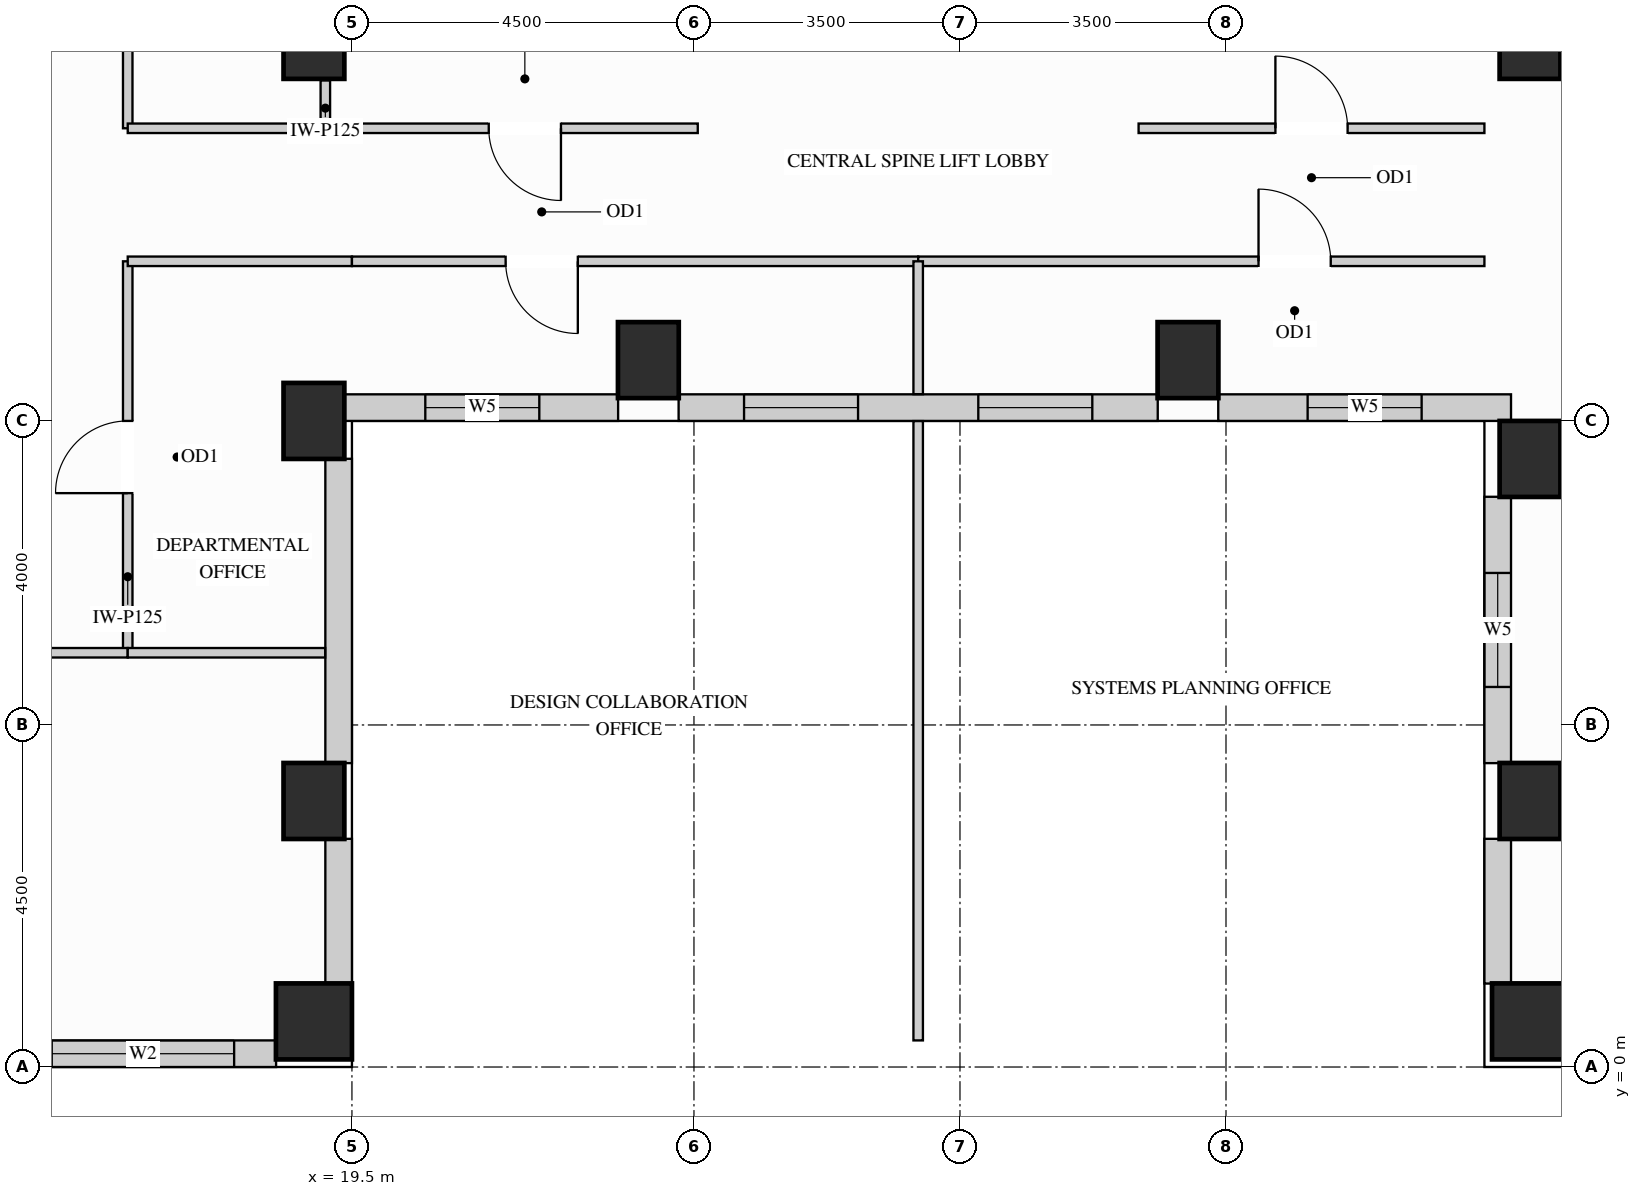
"""IFC4 building model, lengths in metres.
Left out: names, types, materials, properties, quantities, classifications, styles, units other than length and angle.
Written with IfcOpenShell. Run it as: python <this file> out.ifc"""

import sys

from ifc_helpers import new_model, si_unit, direction, frame, frame_2d, origin, origin_2d, place, context, subcontext, project, spatial, rectangle, extrude, source, transform, mapped, element, fill, save


model = new_model("IFC4")
c1 = context("Model", 3, precision=1e-05, world=origin(), true_north=direction((0.0, 1.0)))
c2 = subcontext(c1, "Body", "Model", "MODEL_VIEW")
j1 = project(units=[si_unit("LENGTHUNIT", "METRE"), si_unit("PLANEANGLEUNIT", "RADIAN")], contexts=[c1])
p1 = place(None, origin())
s1 = spatial("IfcSite", under=j1, at=p1, CompositionType="ELEMENT")
p2 = place(p1, origin())
s2 = spatial("IfcBuilding", under=s1, at=p2, CompositionType="ELEMENT")
p3 = place(p2, frame((0.0, 0.0, 171.9)))
s3 = spatial("IfcBuildingStorey", under=s2, at=p3, CompositionType="ELEMENT", Elevation=171.9)
m1 = source(origin(), c2, "Body", "SweptSolid", [
    extrude(rectangle(XDim=0.8, YDim=1.0, at=origin_2d()), origin(), (0.0, 0.0, 1.0), 3.4),
])
for number, where, z_axis, x_axis in (
    (1, (19.0, 13.5, 0.0), (0.0, 0.0, 1.0), (1.0, 0.0, 0.0)),
    (2, (19.0, 3.5, 0.0), (0.0, 0.0, 1.0), (1.0, 0.0, 0.0)),
    (3, (19.0, 8.5, 0.0), (0.0, 0.0, 1.0), (1.0, 0.0, 0.0)),
    (4, (35.0, 13.5, 0.0), (0.0, 0.0, 1.0), (1.0, 0.0, 0.0)),
    (5, (35.0, 3.5, 0.0), (0.0, 0.0, 1.0), (1.0, 0.0, 0.0)),
    (6, (35.0, 8.0, 0.0), (0.0, 0.0, 1.0), (1.0, 0.0, 0.0)),
    (7, (23.4, 9.3, 0.0), (0.0, 0.0, 1.0), (1.0, 0.0, 0.0)),
    (8, (30.5, 9.3, 0.0), (0.0, 0.0, 1.0), (1.0, 0.0, 0.0)),
):
    element("IfcColumn", number, at=place(p3, frame(where, z_axis=z_axis, x_axis=x_axis)), inside=s3, PredefinedType="COLUMN", context=c2, shape_type="MappedRepresentation", body=[
        mapped(m1, transform((0.0, 0.0, 0.0), x_axis=(1.0, 0.0, 0.0), y_axis=(0.0, 1.0, 0.0), z_axis=(0.0, 0.0, 1.0))),
    ])
m2 = source(origin(), c2, "Body", "SweptSolid", [
    extrude(rectangle(XDim=1.0, YDim=1.0, at=origin_2d()), origin(), (0.0, 0.0, 1.0), 3.4),
])
for number, where, z_axis, x_axis in (
    (9, (19.0, 0.6, 0.0), (0.0, 0.0, 1.0), (1.0, 0.0, 0.0)),
    (10, (35.0, 0.6, 0.0), (0.0, 0.0, 1.0), (1.0, 0.0, 0.0)),
):
    element("IfcColumn", number, at=place(p3, frame(where, z_axis=z_axis, x_axis=x_axis)), inside=s3, PredefinedType="COLUMN", context=c2, shape_type="MappedRepresentation", body=[
        mapped(m2, transform((0.0, 0.0, 0.0), x_axis=(1.0, 0.0, 0.0), y_axis=(0.0, 1.0, 0.0), z_axis=(0.0, 0.0, 1.0))),
    ])
p4 = place(p3, frame((14.998, 0.175, 0.0), z_axis=(0.0, 0.0, 1.0), x_axis=(1.0, 0.0, 0.0)))
e11 = element("IfcWall", 11, at=p4, inside=s3, PredefinedType="SOLIDWALL", context=c2, shape_type="SweptSolid", body=[
    extrude(rectangle(XDim=3.504, YDim=0.35, at=frame_2d((1.752, 0.0))), origin(), (0.0, 0.0, 1.0), 2.612),
])
p5 = place(p4, frame((0.552, 0.0, 0.78)))
e12 = element("IfcOpeningElement", 12, at=p5, cuts=e11, PredefinedType="OPENING", context=c2, shape_type="SweptSolid", body=[
    extrude(rectangle(XDim=2.4, YDim=1.652, at=frame_2d((1.2, 0.826))), frame((0.0, 0.185, 0.0), z_axis=(0.0, -1.0, 0.0), x_axis=(1.0, 0.0, 0.0)), (0.0, 0.0, 1.0), 0.37),
])
m3 = source(origin(), c2, "Body", "SweptSolid", [
    extrude(rectangle(XDim=1.904, YDim=0.35, at=frame_2d((0.952, 0.0))), origin(), (0.0, 0.0, 1.0), 2.612),
])
p6 = place(p3, frame((19.325, 1.098, 0.0), z_axis=(0.0, 0.0, 1.0), x_axis=(0.0, 1.0, 0.0)))
e13 = element("IfcWall", 13, at=p6, inside=s3, PredefinedType="SOLIDWALL", context=c2, shape_type="MappedRepresentation", body=[
    mapped(m3, transform((0.0, 0.0, 0.0), x_axis=(1.0, 0.0, 0.0), y_axis=(0.0, 1.0, 0.0), z_axis=(0.0, 0.0, 1.0))),
])
m4 = source(origin(), c2, "Body", "SweptSolid", [
    extrude(rectangle(XDim=4.004, YDim=0.35, at=frame_2d((2.002, 0.0))), origin(), (0.0, 0.0, 1.0), 2.612),
])
p7 = place(p3, frame((19.325, 3.998, 0.0), z_axis=(0.0, 0.0, 1.0), x_axis=(0.0, 1.0, 0.0)))
e14 = element("IfcWall", 14, at=p7, inside=s3, PredefinedType="SOLIDWALL", context=c2, shape_type="MappedRepresentation", body=[
    mapped(m4, transform((0.0, 0.0, 0.0), x_axis=(1.0, 0.0, 0.0), y_axis=(0.0, 1.0, 0.0), z_axis=(0.0, 0.0, 1.0))),
])
p8 = place(p3, frame((19.398, 8.675, 0.0), z_axis=(0.0, 0.0, 1.0), x_axis=(1.0, 0.0, 0.0)))
e15 = element("IfcWall", 15, at=p8, inside=s3, PredefinedType="SOLIDWALL", context=c2, shape_type="SweptSolid", body=[
    extrude(rectangle(XDim=3.604, YDim=0.35, at=frame_2d((1.802, 0.0))), origin(), (0.0, 0.0, 1.0), 3.385),
])
p9 = place(p8, frame((1.067, 0.0, 0.78)))
e16 = element("IfcOpeningElement", 16, at=p9, cuts=e15, PredefinedType="OPENING", context=c2, shape_type="SweptSolid", body=[
    extrude(rectangle(XDim=1.5, YDim=2.0, at=frame_2d((0.75, 1.0))), frame((0.0, 0.185, 0.0), z_axis=(0.0, -1.0, 0.0), x_axis=(1.0, 0.0, 0.0)), (0.0, 0.0, 1.0), 0.37),
])
p10 = place(p3, frame((23.798, 8.675, 0.0), z_axis=(0.0, 0.0, 1.0), x_axis=(1.0, 0.0, 0.0)))
e17 = element("IfcWall", 17, at=p10, inside=s3, PredefinedType="SOLIDWALL", context=c2, shape_type="SweptSolid", body=[
    extrude(rectangle(XDim=6.304, YDim=0.35, at=frame_2d((3.152, 0.0))), origin(), (0.0, 0.0, 1.0), 3.385),
])
p11 = place(p10, frame((0.861, 0.0, 0.78)))
e18 = element("IfcOpeningElement", 18, at=p11, cuts=e17, PredefinedType="OPENING", context=c2, shape_type="SweptSolid", body=[
    extrude(rectangle(XDim=1.5, YDim=2.0, at=frame_2d((0.75, 1.0))), frame((0.0, 0.185, 0.0), z_axis=(0.0, -1.0, 0.0), x_axis=(1.0, 0.0, 0.0)), (0.0, 0.0, 1.0), 0.37),
])
p12 = place(p10, frame((3.943, 0.0, 0.78)))
e19 = element("IfcOpeningElement", 19, at=p12, cuts=e17, PredefinedType="OPENING", context=c2, shape_type="SweptSolid", body=[
    extrude(rectangle(XDim=1.5, YDim=2.0, at=frame_2d((0.75, 1.0))), frame((0.0, 0.185, 0.0), z_axis=(0.0, -1.0, 0.0), x_axis=(1.0, 0.0, 0.0)), (0.0, 0.0, 1.0), 0.37),
])
p13 = place(p3, frame((30.898, 8.675, 0.0), z_axis=(0.0, 0.0, 1.0), x_axis=(1.0, 0.0, 0.0)))
e20 = element("IfcWall", 20, at=p13, inside=s3, PredefinedType="SOLIDWALL", context=c2, shape_type="SweptSolid", body=[
    extrude(rectangle(XDim=3.852, YDim=0.35, at=frame_2d((1.926, 0.0))), origin(), (0.0, 0.0, 1.0), 3.385),
])
p14 = place(p13, frame((1.176, 0.0, 0.78)))
e21 = element("IfcOpeningElement", 21, at=p14, cuts=e20, PredefinedType="OPENING", context=c2, shape_type="SweptSolid", body=[
    extrude(rectangle(XDim=1.5, YDim=2.0, at=frame_2d((0.75, 1.0))), frame((0.0, 0.185, 0.0), z_axis=(0.0, -1.0, 0.0), x_axis=(1.0, 0.0, 0.0)), (0.0, 0.0, 1.0), 0.37),
])
p15 = place(p3, frame((34.575, 7.502, 0.0), z_axis=(0.0, 0.0, 1.0), x_axis=(0.0, -1.0, 0.0)))
e22 = element("IfcWall", 22, at=p15, inside=s3, PredefinedType="SOLIDWALL", context=c2, shape_type="SweptSolid", body=[
    extrude(rectangle(XDim=3.504, YDim=0.35, at=frame_2d((1.752, 0.0))), origin(), (0.0, 0.0, 1.0), 2.612),
])
p16 = place(p15, frame((1.002, 0.0, 0.78)))
e23 = element("IfcOpeningElement", 23, at=p16, cuts=e22, PredefinedType="OPENING", context=c2, shape_type="SweptSolid", body=[
    extrude(rectangle(XDim=1.5, YDim=1.652, at=frame_2d((0.75, 0.826))), frame((0.0, 0.185, 0.0), z_axis=(0.0, -1.0, 0.0), x_axis=(1.0, 0.0, 0.0)), (0.0, 0.0, 1.0), 0.37),
])
p17 = place(p3, frame((34.575, 3.002, 0.0), z_axis=(0.0, 0.0, 1.0), x_axis=(0.0, -1.0, 0.0)))
e24 = element("IfcWall", 24, at=p17, inside=s3, PredefinedType="SOLIDWALL", context=c2, shape_type="MappedRepresentation", body=[
    mapped(m3, transform((0.0, 0.0, 0.0), x_axis=(1.0, 0.0, 0.0), y_axis=(0.0, 1.0, 0.0), z_axis=(0.0, 0.0, 1.0))),
])
m5 = source(origin(), c2, "Body", "SweptSolid", [
    extrude(rectangle(XDim=0.63, YDim=0.125, at=frame_2d((0.315, 0.0))), origin(), (0.0, 0.0, 1.0), 2.773),
])
p18 = place(p3, frame((19.15, 12.35, 0.0), z_axis=(0.0, 0.0, 1.0), x_axis=(0.0, 1.0, 0.0)))
e25 = element("IfcWall", 25, at=p18, inside=s3, PredefinedType="PARTITIONING", context=c2, shape_type="MappedRepresentation", body=[
    mapped(m5, transform((0.0, 0.0, 0.0), x_axis=(1.0, 0.0, 0.0), y_axis=(0.0, 1.0, 0.0), z_axis=(0.0, 0.0, 1.0))),
])
p19 = place(p3, frame((16.55, 12.35, 0.0), z_axis=(0.0, 0.0, 1.0), x_axis=(0.0, 1.0, 0.0)))
e26 = element("IfcWall", 26, at=p19, inside=s3, PredefinedType="PARTITIONING", context=c2, shape_type="SweptSolid", body=[
    extrude(rectangle(XDim=5.55, YDim=0.125, at=frame_2d((2.775, 0.0))), origin(), (0.0, 0.0, 1.0), 3.385),
])
p20 = place(p19, frame((2.3, 0.0, 0.0)))
e27 = element("IfcOpeningElement", 27, at=p20, cuts=e26, PredefinedType="OPENING", context=c2, shape_type="SweptSolid", body=[
    extrude(rectangle(XDim=0.95, YDim=2.15, at=frame_2d((0.475, 1.075))), frame((0.0, 0.073, 0.0), z_axis=(0.0, -1.0, 0.0), x_axis=(1.0, 0.0, 0.0)), (0.0, 0.0, 1.0), 0.145),
])
p21 = place(p3, frame((16.55, 5.45, 0.0), z_axis=(0.0, 0.0, 1.0), x_axis=(0.0, 1.0, 0.0)))
e28 = element("IfcWall", 28, at=p21, inside=s3, PredefinedType="PARTITIONING", context=c2, shape_type="SweptSolid", body=[
    extrude(rectangle(XDim=5.15, YDim=0.125, at=frame_2d((2.575, 0.0))), origin(), (0.0, 0.0, 1.0), 3.385),
])
p22 = place(p21, frame((2.1, 0.0, 0.0)))
e29 = element("IfcOpeningElement", 29, at=p22, cuts=e28, PredefinedType="OPENING", context=c2, shape_type="SweptSolid", body=[
    extrude(rectangle(XDim=0.95, YDim=2.15, at=frame_2d((0.475, 1.075))), frame((0.0, 0.073, 0.0), z_axis=(0.0, -1.0, 0.0), x_axis=(1.0, 0.0, 0.0)), (0.0, 0.0, 1.0), 0.145),
])
p23 = place(p3, frame((29.85, 12.35, 0.0), z_axis=(0.0, 0.0, 1.0), x_axis=(1.0, 0.0, 0.0)))
e30 = element("IfcWall", 30, at=p23, inside=s3, PredefinedType="PARTITIONING", context=c2, shape_type="SweptSolid", body=[
    extrude(rectangle(XDim=4.55, YDim=0.125, at=frame_2d((2.275, 0.0))), origin(), (0.0, 0.0, 1.0), 3.385),
])
p24 = place(p23, frame((1.8, 0.0, 0.0)))
e31 = element("IfcOpeningElement", 31, at=p24, cuts=e30, PredefinedType="OPENING", context=c2, shape_type="SweptSolid", body=[
    extrude(rectangle(XDim=0.95, YDim=2.15, at=frame_2d((0.475, 1.075))), frame((0.0, 0.073, 0.0), z_axis=(0.0, -1.0, 0.0), x_axis=(1.0, 0.0, 0.0)), (0.0, 0.0, 1.0), 0.145),
])
m6 = source(origin(), c2, "Body", "SweptSolid", [
    extrude(rectangle(XDim=2.95, YDim=0.125, at=frame_2d((1.475, 0.0))), origin(), (0.0, 0.0, 1.0), 3.385),
])
p25 = place(p3, frame((16.55, 12.35, 0.0), z_axis=(0.0, 0.0, 1.0), x_axis=(1.0, 0.0, 0.0)))
e32 = element("IfcWall", 32, at=p25, inside=s3, PredefinedType="PARTITIONING", context=c2, shape_type="MappedRepresentation", body=[
    mapped(m6, transform((0.0, 0.0, 0.0), x_axis=(1.0, 0.0, 0.0), y_axis=(0.0, 1.0, 0.0), z_axis=(0.0, 0.0, 1.0))),
])
p26 = place(p3, frame((19.5, 12.35, 0.0), z_axis=(0.0, 0.0, 1.0), x_axis=(1.0, 0.0, 0.0)))
e33 = element("IfcWall", 33, at=p26, inside=s3, PredefinedType="PARTITIONING", context=c2, shape_type="SweptSolid", body=[
    extrude(rectangle(XDim=4.55, YDim=0.125, at=frame_2d((2.275, 0.0))), origin(), (0.0, 0.0, 1.0), 3.385),
])
p27 = place(p26, frame((1.8, 0.0, 0.0)))
e34 = element("IfcOpeningElement", 34, at=p27, cuts=e33, PredefinedType="OPENING", context=c2, shape_type="SweptSolid", body=[
    extrude(rectangle(XDim=0.95, YDim=2.15, at=frame_2d((0.475, 1.075))), frame((0.0, 0.073, 0.0), z_axis=(0.0, -1.0, 0.0), x_axis=(1.0, 0.0, 0.0)), (0.0, 0.0, 1.0), 0.145),
])
p28 = place(p3, frame((16.55, 10.6, 0.0), z_axis=(0.0, 0.0, 1.0), x_axis=(1.0, 0.0, 0.0)))
e35 = element("IfcWall", 35, at=p28, inside=s3, PredefinedType="PARTITIONING", context=c2, shape_type="MappedRepresentation", body=[
    mapped(m6, transform((0.0, 0.0, 0.0), x_axis=(1.0, 0.0, 0.0), y_axis=(0.0, 1.0, 0.0), z_axis=(0.0, 0.0, 1.0))),
])
p29 = place(p3, frame((19.5, 10.6, 0.0), z_axis=(0.0, 0.0, 1.0), x_axis=(1.0, 0.0, 0.0)))
e36 = element("IfcWall", 36, at=p29, inside=s3, PredefinedType="PARTITIONING", context=c2, shape_type="SweptSolid", body=[
    extrude(rectangle(XDim=7.45, YDim=0.125, at=frame_2d((3.725, 0.0))), origin(), (0.0, 0.0, 1.0), 3.385),
])
p30 = place(p29, frame((2.022, 0.0, 0.0)))
e37 = element("IfcOpeningElement", 37, at=p30, cuts=e36, PredefinedType="OPENING", context=c2, shape_type="SweptSolid", body=[
    extrude(rectangle(XDim=0.95, YDim=2.15, at=frame_2d((0.475, 1.075))), frame((0.0, 0.073, 0.0), z_axis=(0.0, -1.0, 0.0), x_axis=(1.0, 0.0, 0.0)), (0.0, 0.0, 1.0), 0.145),
])
p31 = place(p3, frame((26.95, 10.6, 0.0), z_axis=(0.0, 0.0, 1.0), x_axis=(1.0, 0.0, 0.0)))
e38 = element("IfcWall", 38, at=p31, inside=s3, PredefinedType="PARTITIONING", context=c2, shape_type="SweptSolid", body=[
    extrude(rectangle(XDim=7.45, YDim=0.125, at=frame_2d((3.725, 0.0))), origin(), (0.0, 0.0, 1.0), 3.385),
])
p32 = place(p31, frame((4.478, 0.0, 0.0)))
e39 = element("IfcOpeningElement", 39, at=p32, cuts=e38, PredefinedType="OPENING", context=c2, shape_type="SweptSolid", body=[
    extrude(rectangle(XDim=0.95, YDim=2.15, at=frame_2d((0.475, 1.075))), frame((0.0, 0.073, 0.0), z_axis=(0.0, -1.0, 0.0), x_axis=(1.0, 0.0, 0.0)), (0.0, 0.0, 1.0), 0.145),
])
m7 = source(origin(), c2, "Body", "SweptSolid", [
    extrude(rectangle(XDim=8.148, YDim=0.125, at=frame_2d((4.074, 0.0))), origin(), (0.0, 0.0, 1.0), 3.385),
])
p33 = place(p3, frame((26.95, 0.35, 0.0), z_axis=(0.0, 0.0, 1.0), x_axis=(0.0, 1.0, 0.0)))
e40 = element("IfcWall", 40, at=p33, inside=s3, PredefinedType="PARTITIONING", context=c2, shape_type="MappedRepresentation", body=[
    mapped(m7, transform((0.0, 0.0, 0.0), x_axis=(1.0, 0.0, 0.0), y_axis=(0.0, 1.0, 0.0), z_axis=(0.0, 0.0, 1.0))),
])
m8 = source(origin(), c2, "Body", "SweptSolid", [
    extrude(rectangle(XDim=1.748, YDim=0.125, at=frame_2d((0.874, 0.0))), origin(), (0.0, 0.0, 1.0), 3.385),
])
p34 = place(p3, frame((26.95, 8.852, 0.0), z_axis=(0.0, 0.0, 1.0), x_axis=(0.0, 1.0, 0.0)))
e41 = element("IfcWall", 41, at=p34, inside=s3, PredefinedType="PARTITIONING", context=c2, shape_type="MappedRepresentation", body=[
    mapped(m8, transform((0.0, 0.0, 0.0), x_axis=(1.0, 0.0, 0.0), y_axis=(0.0, 1.0, 0.0), z_axis=(0.0, 0.0, 1.0))),
])
p35 = place(p3, frame((2.45, 5.45, 0.0), z_axis=(0.0, 0.0, 1.0), x_axis=(1.0, 0.0, 0.0)))
e42 = element("IfcWall", 42, at=p35, inside=s3, PredefinedType="PARTITIONING", context=c2, shape_type="SweptSolid", body=[
    extrude(rectangle(XDim=14.1, YDim=0.125, at=frame_2d((7.05, 0.0))), origin(), (0.0, 0.0, 1.0), 3.385),
])
p36 = place(p35, frame((6.575, 0.0, 0.0)))
e43 = element("IfcOpeningElement", 43, at=p36, cuts=e42, PredefinedType="OPENING", context=c2, shape_type="SweptSolid", body=[
    extrude(rectangle(XDim=0.95, YDim=2.15, at=frame_2d((0.475, 1.075))), frame((0.0, 0.073, 0.0), z_axis=(0.0, -1.0, 0.0), x_axis=(1.0, 0.0, 0.0)), (0.0, 0.0, 1.0), 0.145),
])
m9 = source(origin(), c2, "Body", "SweptSolid", [
    extrude(rectangle(XDim=2.598, YDim=0.125, at=frame_2d((1.299, 0.0))), origin(), (0.0, 0.0, 1.0), 3.385),
])
p37 = place(p3, frame((16.55, 5.45, 0.0), z_axis=(0.0, 0.0, 1.0), x_axis=(1.0, 0.0, 0.0)))
e44 = element("IfcWall", 44, at=p37, inside=s3, PredefinedType="PARTITIONING", context=c2, shape_type="MappedRepresentation", body=[
    mapped(m9, transform((0.0, 0.0, 0.0), x_axis=(1.0, 0.0, 0.0), y_axis=(0.0, 1.0, 0.0), z_axis=(0.0, 0.0, 1.0))),
])
m10 = source(origin(), c2, "Body", "SweptSolid", [
    extrude(rectangle(XDim=0.95, YDim=2.15, at=frame_2d((0.475, 1.075))), frame((0.0, 0.025, 0.0), z_axis=(0.0, -1.0, 0.0), x_axis=(1.0, 0.0, 0.0)), (0.0, 0.0, 1.0), 0.05),
])
p38 = place(p22, origin())
e45 = element("IfcDoor", 45, at=p38, inside=s3, OperationType="SINGLE_SWING_LEFT", PredefinedType="DOOR", context=c2, shape_type="MappedRepresentation", body=[
    mapped(m10, transform((0.0, 0.0, 0.0), x_axis=(1.0, 0.0, 0.0), y_axis=(0.0, 1.0, 0.0), z_axis=(0.0, 0.0, 1.0))),
])
fill(e29, e45)
p39 = place(p27, origin())
e46 = element("IfcDoor", 46, at=p39, inside=s3, OperationType="SINGLE_SWING_RIGHT", PredefinedType="DOOR", context=c2, shape_type="MappedRepresentation", body=[
    mapped(m10, transform((0.0, 0.0, 0.0), x_axis=(1.0, 0.0, 0.0), y_axis=(0.0, 1.0, 0.0), z_axis=(0.0, 0.0, 1.0))),
])
fill(e34, e46)
p40 = place(p24, origin())
e47 = element("IfcDoor", 47, at=p40, inside=s3, OperationType="SINGLE_SWING_LEFT", PredefinedType="DOOR", context=c2, shape_type="MappedRepresentation", body=[
    mapped(m10, transform((0.0, 0.0, 0.0), x_axis=(1.0, 0.0, 0.0), y_axis=(0.0, 1.0, 0.0), z_axis=(0.0, 0.0, 1.0))),
])
fill(e31, e47)
p41 = place(p30, origin())
e48 = element("IfcDoor", 48, at=p41, inside=s3, OperationType="SINGLE_SWING_RIGHT", PredefinedType="DOOR", context=c2, shape_type="MappedRepresentation", body=[
    mapped(m10, transform((0.0, 0.0, 0.0), x_axis=(1.0, 0.0, 0.0), y_axis=(0.0, 1.0, 0.0), z_axis=(0.0, 0.0, 1.0))),
])
fill(e37, e48)
p42 = place(p32, origin())
e49 = element("IfcDoor", 49, at=p42, inside=s3, OperationType="SINGLE_SWING_LEFT", PredefinedType="DOOR", context=c2, shape_type="MappedRepresentation", body=[
    mapped(m10, transform((0.0, 0.0, 0.0), x_axis=(1.0, 0.0, 0.0), y_axis=(0.0, 1.0, 0.0), z_axis=(0.0, 0.0, 1.0))),
])
fill(e39, e49)
m11 = source(origin(), c2, "Body", "SweptSolid", [
    extrude(rectangle(XDim=2.4, YDim=1.652, at=frame_2d((1.2, 0.826))), frame((0.0, 0.03, 0.0), z_axis=(0.0, -1.0, 0.0), x_axis=(1.0, 0.0, 0.0)), (0.0, 0.0, 1.0), 0.06),
])
p43 = place(p5, origin())
e50 = element("IfcWindow", 50, at=p43, inside=s3, PartitioningType="SINGLE_PANEL", PredefinedType="WINDOW", context=c2, shape_type="MappedRepresentation", body=[
    mapped(m11, transform((0.0, 0.0, 0.0), x_axis=(1.0, 0.0, 0.0), y_axis=(0.0, 1.0, 0.0), z_axis=(0.0, 0.0, 1.0))),
])
fill(e12, e50)
m12 = source(origin(), c2, "Body", "SweptSolid", [
    extrude(rectangle(XDim=1.5, YDim=2.0, at=frame_2d((0.75, 1.0))), frame((0.0, 0.03, 0.0), z_axis=(0.0, -1.0, 0.0), x_axis=(1.0, 0.0, 0.0)), (0.0, 0.0, 1.0), 0.06),
])
p44 = place(p9, origin())
e51 = element("IfcWindow", 51, at=p44, inside=s3, PartitioningType="SINGLE_PANEL", PredefinedType="WINDOW", context=c2, shape_type="MappedRepresentation", body=[
    mapped(m12, transform((0.0, 0.0, 0.0), x_axis=(1.0, 0.0, 0.0), y_axis=(0.0, 1.0, 0.0), z_axis=(0.0, 0.0, 1.0))),
])
fill(e16, e51)
p45 = place(p11, origin())
e52 = element("IfcWindow", 52, at=p45, inside=s3, PartitioningType="SINGLE_PANEL", PredefinedType="WINDOW", context=c2, shape_type="MappedRepresentation", body=[
    mapped(m12, transform((0.0, 0.0, 0.0), x_axis=(1.0, 0.0, 0.0), y_axis=(0.0, 1.0, 0.0), z_axis=(0.0, 0.0, 1.0))),
])
fill(e18, e52)
p46 = place(p12, origin())
e53 = element("IfcWindow", 53, at=p46, inside=s3, PartitioningType="SINGLE_PANEL", PredefinedType="WINDOW", context=c2, shape_type="MappedRepresentation", body=[
    mapped(m12, transform((0.0, 0.0, 0.0), x_axis=(1.0, 0.0, 0.0), y_axis=(0.0, 1.0, 0.0), z_axis=(0.0, 0.0, 1.0))),
])
fill(e19, e53)
p47 = place(p14, origin())
e54 = element("IfcWindow", 54, at=p47, inside=s3, PartitioningType="SINGLE_PANEL", PredefinedType="WINDOW", context=c2, shape_type="MappedRepresentation", body=[
    mapped(m12, transform((0.0, 0.0, 0.0), x_axis=(1.0, 0.0, 0.0), y_axis=(0.0, 1.0, 0.0), z_axis=(0.0, 0.0, 1.0))),
])
fill(e21, e54)
m13 = source(origin(), c2, "Body", "SweptSolid", [
    extrude(rectangle(XDim=1.5, YDim=1.652, at=frame_2d((0.75, 0.826))), frame((0.0, 0.03, 0.0), z_axis=(0.0, -1.0, 0.0), x_axis=(1.0, 0.0, 0.0)), (0.0, 0.0, 1.0), 0.06),
])
p48 = place(p16, origin())
e55 = element("IfcWindow", 55, at=p48, inside=s3, PartitioningType="SINGLE_PANEL", PredefinedType="WINDOW", context=c2, shape_type="MappedRepresentation", body=[
    mapped(m13, transform((0.0, 0.0, 0.0), x_axis=(1.0, 0.0, 0.0), y_axis=(0.0, 1.0, 0.0), z_axis=(0.0, 0.0, 1.0))),
])
fill(e23, e55)
save(model, sys.argv[1])
